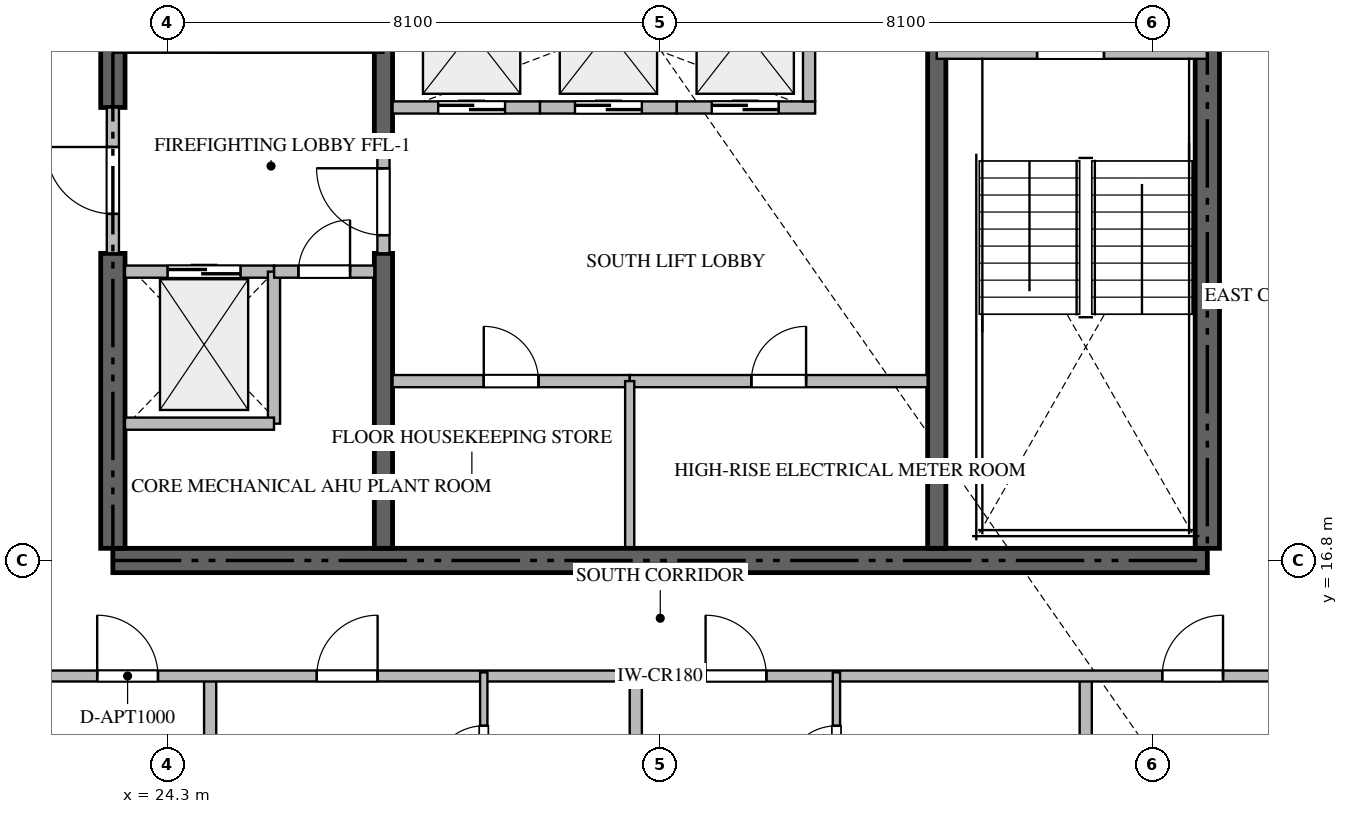
"""IFC4 building model, lengths in metres.
Left out: names, types, materials, properties, quantities, classifications, styles, units other than length and angle.
Written with IfcOpenShell. Run it as: python <this file> out.ifc"""

import sys

from ifc_helpers import new_model, si_unit, direction, frame, frame_2d, origin, place, context, subcontext, project, spatial, rectangle, extrude, source, transform, mapped, element, fill, save


model = new_model("IFC4")
c1 = context("Model", 3, precision=1e-05, world=origin(), true_north=direction((0.0, 1.0)))
c2 = subcontext(c1, "Body", "Model", "MODEL_VIEW")
j1 = project(units=[si_unit("LENGTHUNIT", "METRE"), si_unit("PLANEANGLEUNIT", "RADIAN")], contexts=[c1])
p1 = place(None, origin())
s1 = spatial("IfcSite", under=j1, at=p1, CompositionType="ELEMENT")
p2 = place(p1, origin())
s2 = spatial("IfcBuilding", under=s1, at=p2, CompositionType="ELEMENT")
p3 = place(p2, frame((0.0, 0.0, 150.15)))
s3 = spatial("IfcBuildingStorey", under=s2, at=p3, CompositionType="ELEMENT", Elevation=150.15)
p4 = place(p3, frame((23.4, 16.8, -0.26), z_axis=(0.0, 0.0, 1.0), x_axis=(1.0, 0.0, 0.0)))
e1 = element("IfcWall", 1, at=p4, inside=s3, PredefinedType="SHEAR", context=c2, shape_type="SweptSolid", body=[
    extrude(rectangle(XDim=18.0, YDim=0.4, at=frame_2d((9.0, 0.0))), origin(), (0.0, 0.0, 1.0), 3.748),
])
p5 = place(p3, frame((23.4, 17.0, -0.26), z_axis=(0.0, 0.0, 1.0), x_axis=(0.0, 1.0, 0.0)))
e2 = element("IfcWall", 2, at=p5, inside=s3, PredefinedType="SHEAR", context=c2, shape_type="SweptSolid", body=[
    extrude(rectangle(XDim=4.85, YDim=0.4, at=frame_2d((2.425, 0.0))), origin(), (0.0, 0.0, 1.0), 3.748),
])
p6 = place(p3, frame((23.4, 24.25, -0.26), z_axis=(0.0, 0.0, 1.0), x_axis=(0.0, 1.0, 0.0)))
e3 = element("IfcWall", 3, at=p6, inside=s3, PredefinedType="SHEAR", context=c2, shape_type="SweptSolid", body=[
    extrude(rectangle(XDim=9.15, YDim=0.4, at=frame_2d((4.575, 0.0))), origin(), (0.0, 0.0, 1.0), 3.748),
])
p7 = place(p3, frame((41.4, 17.0, -0.26), z_axis=(0.0, 0.0, 1.0), x_axis=(0.0, 1.0, 0.0)))
e4 = element("IfcWall", 4, at=p7, inside=s3, PredefinedType="SHEAR", context=c2, shape_type="SweptSolid", body=[
    extrude(rectangle(XDim=8.35, YDim=0.4, at=frame_2d((4.175, 0.0))), origin(), (0.0, 0.0, 1.0), 3.748),
])
p8 = place(p3, frame((27.85, 17.0, -0.26), z_axis=(0.0, 0.0, 1.0), x_axis=(0.0, 1.0, 0.0)))
e5 = element("IfcWall", 5, at=p8, inside=s3, PredefinedType="SHEAR", context=c2, shape_type="SweptSolid", body=[
    extrude(rectangle(XDim=4.85, YDim=0.3, at=frame_2d((2.425, 0.0))), origin(), (0.0, 0.0, 1.0), 3.748),
])
p9 = place(p3, frame((27.85, 23.55, -0.26), z_axis=(0.0, 0.0, 1.0), x_axis=(0.0, 1.0, 0.0)))
e6 = element("IfcWall", 6, at=p9, inside=s3, PredefinedType="SHEAR", context=c2, shape_type="SweptSolid", body=[
    extrude(rectangle(XDim=9.85, YDim=0.3, at=frame_2d((4.925, 0.0))), origin(), (0.0, 0.0, 1.0), 3.748),
])
p10 = place(p3, frame((36.95, 17.0, -0.26), z_axis=(0.0, 0.0, 1.0), x_axis=(0.0, 1.0, 0.0)))
e7 = element("IfcWall", 7, at=p10, inside=s3, PredefinedType="SHEAR", context=c2, shape_type="SweptSolid", body=[
    extrude(rectangle(XDim=8.35, YDim=0.3, at=frame_2d((4.175, 0.0))), origin(), (0.0, 0.0, 1.0), 3.748),
])
p11 = place(p3, frame((36.95, 25.15, 0.0), z_axis=(0.0, 0.0, 1.0), x_axis=(1.0, 0.0, 0.0)))
e8 = element("IfcWall", 8, at=p11, inside=s3, PredefinedType="STANDARD", context=c2, shape_type="SweptSolid", body=[
    extrude(rectangle(XDim=4.45, YDim=0.2, at=frame_2d((2.225, 0.0))), origin(), (0.0, 0.0, 1.0), 3.49),
])
p12 = place(p11, frame((1.65, 0.0, 0.0)))
e9 = element("IfcOpeningElement", 9, at=p12, cuts=e8, PredefinedType="OPENING", context=c2, shape_type="SweptSolid", body=[
    extrude(rectangle(XDim=1.1, YDim=2.15, at=frame_2d((0.55, 1.075))), frame((0.0, 0.11, 0.0), z_axis=(0.0, -1.0, 0.0), x_axis=(1.0, 0.0, 0.0)), (0.0, 0.0, 1.0), 0.22),
])
p13 = place(p3, frame((23.6, 21.55, 0.0), z_axis=(0.0, 0.0, 1.0), x_axis=(1.0, 0.0, 0.0)))
e10 = element("IfcWall", 10, at=p13, inside=s3, PredefinedType="STANDARD", context=c2, shape_type="SweptSolid", body=[
    extrude(rectangle(XDim=2.45, YDim=0.2, at=frame_2d((1.225, 0.0))), origin(), (0.0, 0.0, 1.0), 3.49),
])
p14 = place(p13, frame((0.7, 0.0, 0.0)))
e11 = element("IfcOpeningElement", 11, at=p14, cuts=e10, PredefinedType="OPENING", context=c2, shape_type="SweptSolid", body=[
    extrude(rectangle(XDim=1.2, YDim=2.2, at=frame_2d((0.6, 1.1))), frame((0.0, 0.11, 0.0), z_axis=(0.0, -1.0, 0.0), x_axis=(1.0, 0.0, 0.0)), (0.0, 0.0, 1.0), 0.22),
])
p15 = place(p3, frame((28.0, 24.25, 0.0), z_axis=(0.0, 0.0, 1.0), x_axis=(1.0, 0.0, 0.0)))
e12 = element("IfcWall", 12, at=p15, inside=s3, PredefinedType="STANDARD", context=c2, shape_type="SweptSolid", body=[
    extrude(rectangle(XDim=2.425, YDim=0.2, at=frame_2d((1.212, 0.0))), origin(), (0.0, 0.0, 1.0), 3.49),
])
p16 = place(p15, frame((0.75, 0.0, 0.0)))
e13 = element("IfcOpeningElement", 13, at=p16, cuts=e12, PredefinedType="OPENING", context=c2, shape_type="SweptSolid", body=[
    extrude(rectangle(XDim=1.1, YDim=2.2, at=frame_2d((0.55, 1.1))), frame((0.0, 0.11, 0.0), z_axis=(0.0, -1.0, 0.0), x_axis=(1.0, 0.0, 0.0)), (0.0, 0.0, 1.0), 0.22),
])
p17 = place(p3, frame((30.425, 24.25, 0.0), z_axis=(0.0, 0.0, 1.0), x_axis=(1.0, 0.0, 0.0)))
e14 = element("IfcWall", 14, at=p17, inside=s3, PredefinedType="STANDARD", context=c2, shape_type="SweptSolid", body=[
    extrude(rectangle(XDim=2.25, YDim=0.2, at=frame_2d((1.125, 0.0))), origin(), (0.0, 0.0, 1.0), 3.49),
])
p18 = place(p17, frame((0.575, 0.0, 0.0)))
e15 = element("IfcOpeningElement", 15, at=p18, cuts=e14, PredefinedType="OPENING", context=c2, shape_type="SweptSolid", body=[
    extrude(rectangle(XDim=1.1, YDim=2.2, at=frame_2d((0.55, 1.1))), frame((0.0, 0.11, 0.0), z_axis=(0.0, -1.0, 0.0), x_axis=(1.0, 0.0, 0.0)), (0.0, 0.0, 1.0), 0.22),
])
p19 = place(p3, frame((32.675, 24.25, 0.0), z_axis=(0.0, 0.0, 1.0), x_axis=(1.0, 0.0, 0.0)))
e16 = element("IfcWall", 16, at=p19, inside=s3, PredefinedType="STANDARD", context=c2, shape_type="SweptSolid", body=[
    extrude(rectangle(XDim=2.275, YDim=0.2, at=frame_2d((1.137, 0.0))), origin(), (0.0, 0.0, 1.0), 3.49),
])
p20 = place(p19, frame((0.575, 0.0, 0.0)))
e17 = element("IfcOpeningElement", 17, at=p20, cuts=e16, PredefinedType="OPENING", context=c2, shape_type="SweptSolid", body=[
    extrude(rectangle(XDim=1.1, YDim=2.2, at=frame_2d((0.55, 1.1))), frame((0.0, 0.11, 0.0), z_axis=(0.0, -1.0, 0.0), x_axis=(1.0, 0.0, 0.0)), (0.0, 0.0, 1.0), 0.22),
])
for number, where, z_axis, x_axis in (
    (18, (34.85, 24.35, 0.0), (0.0, 0.0, 1.0), (0.0, 1.0, 0.0)),
    (19, (26.05, 19.05, 0.0), (0.0, 0.0, 1.0), (0.0, 1.0, 0.0)),
):
    element("IfcWall", number, at=place(p3, frame(where, z_axis=z_axis, x_axis=x_axis)), inside=s3, PredefinedType="STANDARD", context=c2, shape_type="SweptSolid", body=[
        extrude(rectangle(XDim=2.5, YDim=0.2, at=frame_2d((1.25, 0.0))), origin(), (0.0, 0.0, 1.0), 3.49),
    ])
p21 = place(p3, frame((23.6, 19.05, 0.0), z_axis=(0.0, 0.0, 1.0), x_axis=(1.0, 0.0, 0.0)))
e20 = element("IfcWall", 20, at=p21, inside=s3, PredefinedType="STANDARD", context=c2, shape_type="SweptSolid", body=[
    extrude(rectangle(XDim=2.45, YDim=0.2, at=frame_2d((1.225, 0.0))), origin(), (0.0, 0.0, 1.0), 3.49),
])
p22 = place(p3, frame((26.052, 21.55, 0.0), z_axis=(0.0, 0.0, 1.0), x_axis=(1.0, 0.0, 0.0)))
e21 = element("IfcWall", 21, at=p22, inside=s3, PredefinedType="STANDARD", context=c2, shape_type="SweptSolid", body=[
    extrude(rectangle(XDim=1.648, YDim=0.2, at=frame_2d((0.824, 0.0))), origin(), (0.0, 0.0, 1.0), 3.49),
])
p23 = place(p22, frame((0.399, 0.0, 0.0)))
e22 = element("IfcOpeningElement", 22, at=p23, cuts=e21, PredefinedType="OPENING", context=c2, shape_type="SweptSolid", body=[
    extrude(rectangle(XDim=0.85, YDim=2.1, at=frame_2d((0.425, 1.05))), frame((0.0, 0.11, 0.0), z_axis=(0.0, -1.0, 0.0), x_axis=(1.0, 0.0, 0.0)), (0.0, 0.0, 1.0), 0.22),
])
p24 = place(p3, frame((23.4, 21.852, 0.0), z_axis=(0.0, 0.0, 1.0), x_axis=(0.0, 1.0, 0.0)))
e23 = element("IfcWall", 23, at=p24, inside=s3, PredefinedType="STANDARD", context=c2, shape_type="SweptSolid", body=[
    extrude(rectangle(XDim=2.396, YDim=0.2, at=frame_2d((1.198, 0.0))), origin(), (0.0, 0.0, 1.0), 3.49),
])
p25 = place(p24, frame((0.648, 0.0, 0.0)))
e24 = element("IfcOpeningElement", 24, at=p25, cuts=e23, PredefinedType="OPENING", context=c2, shape_type="SweptSolid", body=[
    extrude(rectangle(XDim=1.1, YDim=2.15, at=frame_2d((0.55, 1.075))), frame((0.0, 0.11, 0.0), z_axis=(0.0, -1.0, 0.0), x_axis=(1.0, 0.0, 0.0)), (0.0, 0.0, 1.0), 0.22),
])
p26 = place(p3, frame((27.85, 21.852, 0.0), z_axis=(0.0, 0.0, 1.0), x_axis=(0.0, 1.0, 0.0)))
e25 = element("IfcWall", 25, at=p26, inside=s3, PredefinedType="STANDARD", context=c2, shape_type="SweptSolid", body=[
    extrude(rectangle(XDim=1.696, YDim=0.2, at=frame_2d((0.848, 0.0))), origin(), (0.0, 0.0, 1.0), 3.49),
])
p27 = place(p26, frame((0.298, 0.0, 0.0)))
e26 = element("IfcOpeningElement", 26, at=p27, cuts=e25, PredefinedType="OPENING", context=c2, shape_type="SweptSolid", body=[
    extrude(rectangle(XDim=1.1, YDim=2.15, at=frame_2d((0.55, 1.075))), frame((0.0, 0.11, 0.0), z_axis=(0.0, -1.0, 0.0), x_axis=(1.0, 0.0, 0.0)), (0.0, 0.0, 1.0), 0.22),
])
p28 = place(p3, frame((28.0, 19.75, 0.0), z_axis=(0.0, 0.0, 1.0), x_axis=(1.0, 0.0, 0.0)))
e27 = element("IfcWall", 27, at=p28, inside=s3, PredefinedType="STANDARD", context=c2, shape_type="SweptSolid", body=[
    extrude(rectangle(XDim=3.9, YDim=0.2, at=frame_2d((1.95, 0.0))), origin(), (0.0, 0.0, 1.0), 3.49),
])
p29 = place(p28, frame((1.5, 0.0, 0.0)))
e28 = element("IfcOpeningElement", 28, at=p29, cuts=e27, PredefinedType="OPENING", context=c2, shape_type="SweptSolid", body=[
    extrude(rectangle(XDim=0.9, YDim=2.1, at=frame_2d((0.45, 1.05))), frame((0.0, 0.11, 0.0), z_axis=(0.0, -1.0, 0.0), x_axis=(1.0, 0.0, 0.0)), (0.0, 0.0, 1.0), 0.22),
])
p30 = place(p3, frame((31.902, 19.75, 0.0), z_axis=(0.0, 0.0, 1.0), x_axis=(1.0, 0.0, 0.0)))
e29 = element("IfcWall", 29, at=p30, inside=s3, PredefinedType="STANDARD", context=c2, shape_type="SweptSolid", body=[
    extrude(rectangle(XDim=4.898, YDim=0.2, at=frame_2d((2.449, 0.0))), origin(), (0.0, 0.0, 1.0), 3.49),
])
p31 = place(p30, frame((1.999, 0.0, 0.0)))
e30 = element("IfcOpeningElement", 30, at=p31, cuts=e29, PredefinedType="OPENING", context=c2, shape_type="SweptSolid", body=[
    extrude(rectangle(XDim=0.9, YDim=2.1, at=frame_2d((0.45, 1.05))), frame((0.0, 0.11, 0.0), z_axis=(0.0, -1.0, 0.0), x_axis=(1.0, 0.0, 0.0)), (0.0, 0.0, 1.0), 0.22),
])
p32 = place(p3, frame((31.9, 17.02, 0.0), z_axis=(0.0, 0.0, 1.0), x_axis=(0.0, 1.0, 0.0)))
e31 = element("IfcWall", 31, at=p32, inside=s3, PredefinedType="PARTITIONING", context=c2, shape_type="SweptSolid", body=[
    extrude(rectangle(XDim=2.73, YDim=0.15, at=frame_2d((1.365, 0.0))), origin(), (0.0, 0.0, 1.0), 3.49),
])
for number, where, z_axis, x_axis in (
    (32, (25.0, 1.482, 0.0), (0.0, 0.0, 1.0), (0.0, 1.0, 0.0)),
    (33, (32.0, 1.482, 0.0), (0.0, 0.0, 1.0), (0.0, 1.0, 0.0)),
    (34, (39.4, 1.482, 0.0), (0.0, 0.0, 1.0), (0.0, 1.0, 0.0)),
):
    element("IfcWall", number, at=place(p3, frame(where, z_axis=z_axis, x_axis=x_axis)), inside=s3, PredefinedType="PARTITIONING", context=c2, shape_type="SweptSolid", body=[
        extrude(rectangle(XDim=13.418, YDim=0.2, at=frame_2d((6.709, 0.0))), origin(), (0.0, 0.0, 1.0), 3.49),
    ])
p33 = place(p3, frame((20.952, 14.9, 0.0), z_axis=(0.0, 0.0, 1.0), x_axis=(1.0, 0.0, 0.0)))
e35 = element("IfcWall", 35, at=p33, inside=s3, PredefinedType="PARTITIONING", context=c2, shape_type="SweptSolid", body=[
    extrude(rectangle(XDim=22.896, YDim=0.18, at=frame_2d((11.448, 0.0))), origin(), (0.0, 0.0, 1.0), 3.49),
])
p34 = place(p33, frame((2.19, 0.0, 0.0)))
e36 = element("IfcOpeningElement", 36, at=p34, cuts=e35, PredefinedType="OPENING", context=c2, shape_type="SweptSolid", body=[
    extrude(rectangle(XDim=1.0, YDim=2.15, at=frame_2d((0.5, 1.075))), frame((0.0, 0.1, 0.0), z_axis=(0.0, -1.0, 0.0), x_axis=(1.0, 0.0, 0.0)), (0.0, 0.0, 1.0), 0.2),
])
p35 = place(p33, frame((5.802, 0.0, 0.0)))
e37 = element("IfcOpeningElement", 37, at=p35, cuts=e35, PredefinedType="OPENING", context=c2, shape_type="SweptSolid", body=[
    extrude(rectangle(XDim=1.0, YDim=2.15, at=frame_2d((0.5, 1.075))), frame((0.0, 0.1, 0.0), z_axis=(0.0, -1.0, 0.0), x_axis=(1.0, 0.0, 0.0)), (0.0, 0.0, 1.0), 0.2),
])
p36 = place(p33, frame((12.196, 0.0, 0.0)))
e38 = element("IfcOpeningElement", 38, at=p36, cuts=e35, PredefinedType="OPENING", context=c2, shape_type="SweptSolid", body=[
    extrude(rectangle(XDim=1.0, YDim=2.15, at=frame_2d((0.5, 1.075))), frame((0.0, 0.1, 0.0), z_axis=(0.0, -1.0, 0.0), x_axis=(1.0, 0.0, 0.0)), (0.0, 0.0, 1.0), 0.2),
])
p37 = place(p33, frame((19.706, 0.0, 0.0)))
e39 = element("IfcOpeningElement", 39, at=p37, cuts=e35, PredefinedType="OPENING", context=c2, shape_type="SweptSolid", body=[
    extrude(rectangle(XDim=1.0, YDim=2.15, at=frame_2d((0.5, 1.075))), frame((0.0, 0.1, 0.0), z_axis=(0.0, -1.0, 0.0), x_axis=(1.0, 0.0, 0.0)), (0.0, 0.0, 1.0), 0.2),
])
p38 = place(p3, frame((29.5, 12.352, 0.0), z_axis=(0.0, 0.0, 1.0), x_axis=(0.0, 1.0, 0.0)))
e40 = element("IfcWall", 40, at=p38, inside=s3, PredefinedType="PARTITIONING", context=c2, shape_type="SweptSolid", body=[
    extrude(rectangle(XDim=2.608, YDim=0.12, at=frame_2d((1.304, 0.0))), origin(), (0.0, 0.0, 1.0), 3.49),
])
p39 = place(p38, frame((0.879, 0.0, 0.0)))
e41 = element("IfcOpeningElement", 41, at=p39, cuts=e40, PredefinedType="OPENING", context=c2, shape_type="SweptSolid", body=[
    extrude(rectangle(XDim=0.85, YDim=2.1, at=frame_2d((0.425, 1.05))), frame((0.0, 0.07, 0.0), z_axis=(0.0, -1.0, 0.0), x_axis=(1.0, 0.0, 0.0)), (0.0, 0.0, 1.0), 0.14),
])
p40 = place(p3, frame((35.3, 12.352, 0.0), z_axis=(0.0, 0.0, 1.0), x_axis=(0.0, 1.0, 0.0)))
e42 = element("IfcWall", 42, at=p40, inside=s3, PredefinedType="PARTITIONING", context=c2, shape_type="SweptSolid", body=[
    extrude(rectangle(XDim=2.608, YDim=0.12, at=frame_2d((1.304, 0.0))), origin(), (0.0, 0.0, 1.0), 3.49),
])
p41 = place(p40, frame((0.879, 0.0, 0.0)))
e43 = element("IfcOpeningElement", 43, at=p41, cuts=e42, PredefinedType="OPENING", context=c2, shape_type="SweptSolid", body=[
    extrude(rectangle(XDim=0.85, YDim=2.1, at=frame_2d((0.425, 1.05))), frame((0.0, 0.07, 0.0), z_axis=(0.0, -1.0, 0.0), x_axis=(1.0, 0.0, 0.0)), (0.0, 0.0, 1.0), 0.14),
])
m1 = source(origin(), c2, "Body", "SweptSolid", [
    extrude(rectangle(XDim=1.1, YDim=2.15, at=frame_2d((0.55, 1.075))), frame((0.0, 0.025, 0.0), z_axis=(0.0, -1.0, 0.0), x_axis=(1.0, 0.0, 0.0)), (0.0, 0.0, 1.0), 0.05),
])
p42 = place(p12, origin())
e44 = element("IfcDoor", 44, at=p42, inside=s3, OperationType="SINGLE_SWING_RIGHT", PredefinedType="DOOR", context=c2, shape_type="MappedRepresentation", body=[
    mapped(m1, transform((0.0, 0.0, 0.0), scale=1.0)),
])
fill(e9, e44)
m2 = source(origin(), c2, "Body", "SweptSolid", [
    extrude(rectangle(XDim=1.2, YDim=2.2, at=frame_2d((0.6, 1.1))), frame((0.0, 0.025, 0.0), z_axis=(0.0, -1.0, 0.0), x_axis=(1.0, 0.0, 0.0)), (0.0, 0.0, 1.0), 0.05),
])
p43 = place(p14, origin())
e45 = element("IfcDoor", 45, at=p43, inside=s3, OperationType="DOUBLE_DOOR_SLIDING", PredefinedType="DOOR", context=c2, shape_type="MappedRepresentation", body=[
    mapped(m2, transform((0.0, 0.0, 0.0), scale=1.0)),
])
fill(e11, e45)
m3 = source(origin(), c2, "Body", "SweptSolid", [
    extrude(rectangle(XDim=1.1, YDim=2.2, at=frame_2d((0.55, 1.1))), frame((0.0, 0.025, 0.0), z_axis=(0.0, -1.0, 0.0), x_axis=(1.0, 0.0, 0.0)), (0.0, 0.0, 1.0), 0.05),
])
p44 = place(p16, origin())
e46 = element("IfcDoor", 46, at=p44, inside=s3, OperationType="DOUBLE_DOOR_SLIDING", PredefinedType="DOOR", context=c2, shape_type="MappedRepresentation", body=[
    mapped(m3, transform((0.0, 0.0, 0.0), scale=1.0)),
])
fill(e13, e46)
p45 = place(p18, origin())
e47 = element("IfcDoor", 47, at=p45, inside=s3, OperationType="DOUBLE_DOOR_SLIDING", PredefinedType="DOOR", context=c2, shape_type="MappedRepresentation", body=[
    mapped(m3, transform((0.0, 0.0, 0.0), scale=1.0)),
])
fill(e15, e47)
p46 = place(p20, origin())
e48 = element("IfcDoor", 48, at=p46, inside=s3, OperationType="DOUBLE_DOOR_SLIDING", PredefinedType="DOOR", context=c2, shape_type="MappedRepresentation", body=[
    mapped(m3, transform((0.0, 0.0, 0.0), scale=1.0)),
])
fill(e17, e48)
m4 = source(origin(), c2, "Body", "SweptSolid", [
    extrude(rectangle(XDim=0.85, YDim=2.1, at=frame_2d((0.425, 1.05))), frame((0.0, 0.025, 0.0), z_axis=(0.0, -1.0, 0.0), x_axis=(1.0, 0.0, 0.0)), (0.0, 0.0, 1.0), 0.05),
])
p47 = place(p23, origin())
e49 = element("IfcDoor", 49, at=p47, inside=s3, OperationType="SINGLE_SWING_RIGHT", PredefinedType="DOOR", context=c2, shape_type="MappedRepresentation", body=[
    mapped(m4, transform((0.0, 0.0, 0.0), scale=1.0)),
])
fill(e22, e49)
p48 = place(p25, origin())
e50 = element("IfcDoor", 50, at=p48, inside=s3, OperationType="SINGLE_SWING_RIGHT", PredefinedType="DOOR", context=c2, shape_type="MappedRepresentation", body=[
    mapped(m1, transform((0.0, 0.0, 0.0), scale=1.0)),
])
fill(e24, e50)
p49 = place(p27, origin())
e51 = element("IfcDoor", 51, at=p49, inside=s3, OperationType="SINGLE_SWING_RIGHT", PredefinedType="DOOR", context=c2, shape_type="MappedRepresentation", body=[
    mapped(m1, transform((0.0, 0.0, 0.0), scale=1.0)),
])
fill(e26, e51)
m5 = source(origin(), c2, "Body", "SweptSolid", [
    extrude(rectangle(XDim=0.9, YDim=2.1, at=frame_2d((0.45, 1.05))), frame((0.0, 0.025, 0.0), z_axis=(0.0, -1.0, 0.0), x_axis=(1.0, 0.0, 0.0)), (0.0, 0.0, 1.0), 0.05),
])
p50 = place(p29, origin())
e52 = element("IfcDoor", 52, at=p50, inside=s3, OperationType="SINGLE_SWING_LEFT", PredefinedType="DOOR", context=c2, shape_type="MappedRepresentation", body=[
    mapped(m5, transform((0.0, 0.0, 0.0), scale=1.0)),
])
fill(e28, e52)
p51 = place(p31, origin())
e53 = element("IfcDoor", 53, at=p51, inside=s3, OperationType="SINGLE_SWING_RIGHT", PredefinedType="DOOR", context=c2, shape_type="MappedRepresentation", body=[
    mapped(m5, transform((0.0, 0.0, 0.0), scale=1.0)),
])
fill(e30, e53)
m6 = source(origin(), c2, "Body", "SweptSolid", [
    extrude(rectangle(XDim=1.0, YDim=2.15, at=frame_2d((0.5, 1.075))), frame((0.0, 0.025, 0.0), z_axis=(0.0, -1.0, 0.0), x_axis=(1.0, 0.0, 0.0)), (0.0, 0.0, 1.0), 0.05),
])
p52 = place(p34, origin())
e54 = element("IfcDoor", 54, at=p52, inside=s3, OperationType="SINGLE_SWING_LEFT", PredefinedType="DOOR", context=c2, shape_type="MappedRepresentation", body=[
    mapped(m6, transform((0.0, 0.0, 0.0), scale=1.0)),
])
fill(e36, e54)
p53 = place(p35, origin())
e55 = element("IfcDoor", 55, at=p53, inside=s3, OperationType="SINGLE_SWING_RIGHT", PredefinedType="DOOR", context=c2, shape_type="MappedRepresentation", body=[
    mapped(m6, transform((0.0, 0.0, 0.0), scale=1.0)),
])
fill(e37, e55)
p54 = place(p36, origin())
e56 = element("IfcDoor", 56, at=p54, inside=s3, OperationType="SINGLE_SWING_LEFT", PredefinedType="DOOR", context=c2, shape_type="MappedRepresentation", body=[
    mapped(m6, transform((0.0, 0.0, 0.0), scale=1.0)),
])
fill(e38, e56)
p55 = place(p37, origin())
e57 = element("IfcDoor", 57, at=p55, inside=s3, OperationType="SINGLE_SWING_RIGHT", PredefinedType="DOOR", context=c2, shape_type="MappedRepresentation", body=[
    mapped(m6, transform((0.0, 0.0, 0.0), scale=1.0)),
])
fill(e39, e57)
p56 = place(p39, origin())
e58 = element("IfcDoor", 58, at=p56, inside=s3, OperationType="SINGLE_SWING_LEFT", PredefinedType="DOOR", context=c2, shape_type="MappedRepresentation", body=[
    mapped(m4, transform((0.0, 0.0, 0.0), scale=1.0)),
])
fill(e41, e58)
p57 = place(p41, origin())
e59 = element("IfcDoor", 59, at=p57, inside=s3, OperationType="SINGLE_SWING_LEFT", PredefinedType="DOOR", context=c2, shape_type="MappedRepresentation", body=[
    mapped(m4, transform((0.0, 0.0, 0.0), scale=1.0)),
])
fill(e43, e59)
save(model, sys.argv[1])
